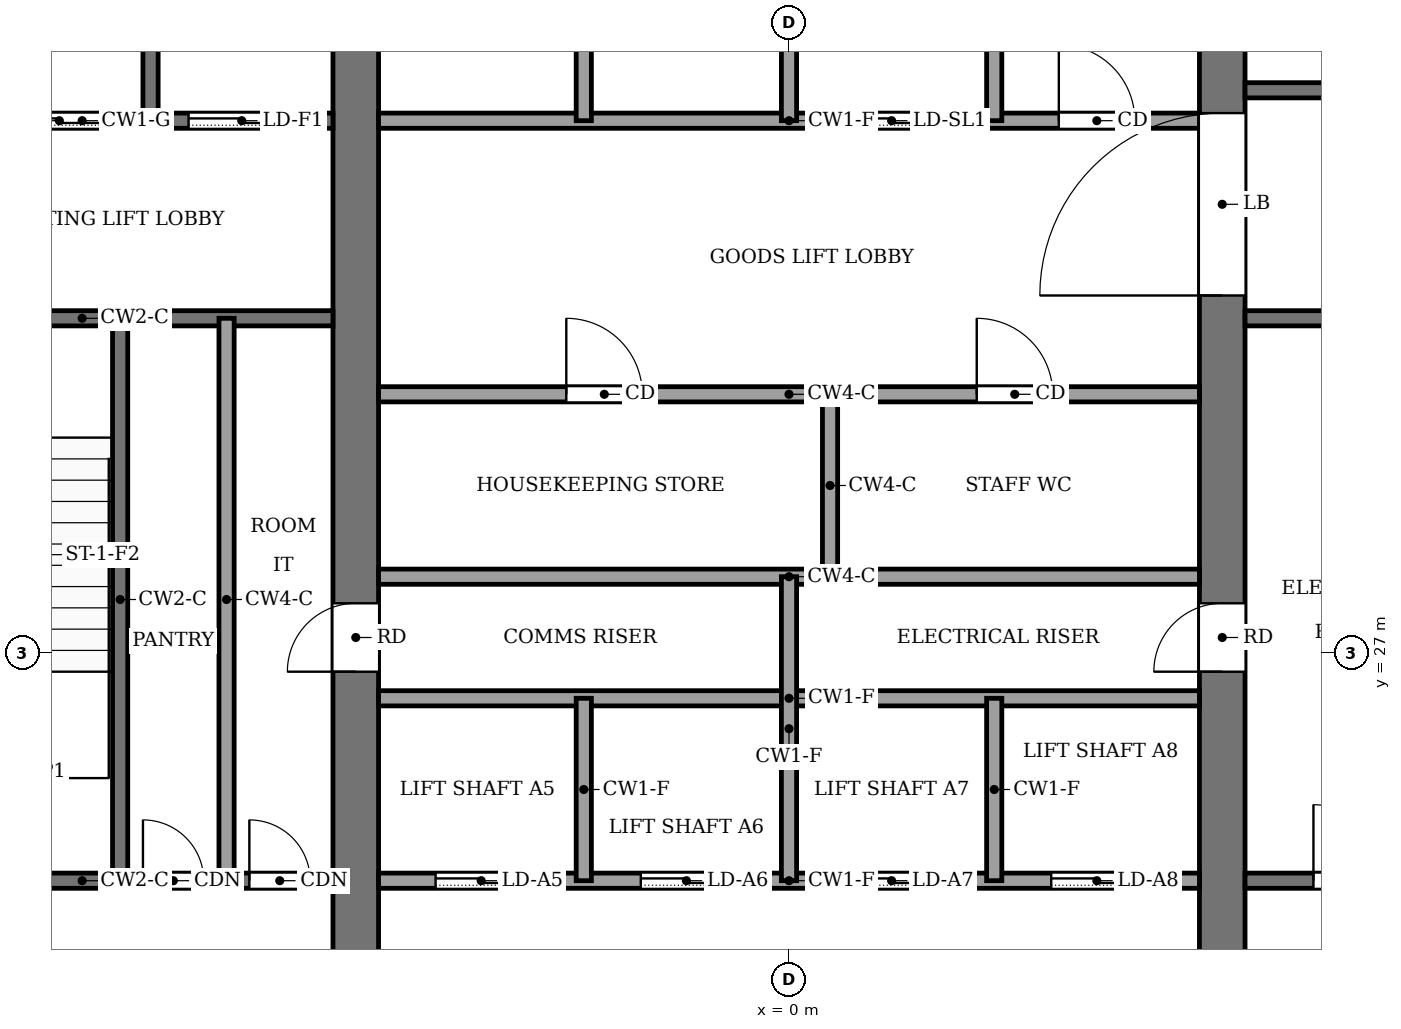
"""IFC4 building model, lengths in metres.
Left out: names, types, materials, properties, quantities, classifications, styles, units other than length and angle.
Written with IfcOpenShell. Run it as: python <this file> out.ifc"""

import sys

from ifc_helpers import new_model, si_unit, direction, frame, frame_2d, origin, place, context, subcontext, project, spatial, rectangle, extrude, element, fill, save


model = new_model("IFC4")
c1 = context("Model", 3, precision=1e-05, world=origin(), true_north=direction((0.0, 1.0)))
c2 = subcontext(c1, "Body", "Model", "MODEL_VIEW")
j1 = project(units=[si_unit("LENGTHUNIT", "METRE"), si_unit("PLANEANGLEUNIT", "RADIAN")], contexts=[c1])
p1 = place(None, origin())
s1 = spatial("IfcSite", under=j1, at=p1, CompositionType="ELEMENT")
p2 = place(p1, origin())
s2 = spatial("IfcBuilding", under=s1, at=p2, CompositionType="ELEMENT")
p3 = place(p2, frame((0.0, 0.0, 242.0)))
s3 = spatial("IfcBuildingStorey", under=s2, at=p3, CompositionType="ELEMENT", Elevation=242.0)
p4 = place(p3, frame((-5.7, 18.4, -0.13), z_axis=(0.0, 0.0, 1.0), x_axis=(0.0, 1.0, 0.0)))
e1 = element("IfcWall", 1, at=p4, inside=s3, PredefinedType="SHEAR", context=c2, shape_type="SweptSolid", body=[
    extrude(rectangle(XDim=19.2, YDim=0.6, at=frame_2d((9.6, 0.0))), origin(), (0.0, 0.0, 1.0), 4.0),
])
p5 = place(p4, frame((8.35, 0.0, 0.13)))
e2 = element("IfcOpeningElement", 2, at=p5, cuts=e1, PredefinedType="OPENING", context=c2, shape_type="SweptSolid", body=[
    extrude(rectangle(XDim=0.9, YDim=2.1, at=frame_2d((0.45, 1.05))), frame((0.0, 0.31, 0.0), z_axis=(0.0, -1.0, 0.0), x_axis=(1.0, 0.0, 0.0)), (0.0, 0.0, 1.0), 0.62),
])
p6 = place(p3, frame((5.7, 18.4, -0.13), z_axis=(0.0, 0.0, 1.0), x_axis=(0.0, 1.0, 0.0)))
e3 = element("IfcWall", 3, at=p6, inside=s3, PredefinedType="SHEAR", context=c2, shape_type="SweptSolid", body=[
    extrude(rectangle(XDim=19.2, YDim=0.6, at=frame_2d((9.6, 0.0))), origin(), (0.0, 0.0, 1.0), 4.0),
])
p7 = place(p6, frame((8.35, 0.0, 0.13)))
e4 = element("IfcOpeningElement", 4, at=p7, cuts=e3, PredefinedType="OPENING", context=c2, shape_type="SweptSolid", body=[
    extrude(rectangle(XDim=0.9, YDim=2.1, at=frame_2d((0.45, 1.05))), frame((0.0, 0.31, 0.0), z_axis=(0.0, -1.0, 0.0), x_axis=(1.0, 0.0, 0.0)), (0.0, 0.0, 1.0), 0.62),
])
p8 = place(p6, frame((13.3, 0.0, 0.13)))
e5 = element("IfcOpeningElement", 5, at=p8, cuts=e3, PredefinedType="OPENING", context=c2, shape_type="SweptSolid", body=[
    extrude(rectangle(XDim=2.4, YDim=2.4, at=frame_2d((1.2, 1.2))), frame((0.0, 0.31, 0.0), z_axis=(0.0, -1.0, 0.0), x_axis=(1.0, 0.0, 0.0)), (0.0, 0.0, 1.0), 0.62),
])
p9 = place(p3, frame((-12.6, 24.0, 0.0), z_axis=(0.0, 0.0, 1.0), x_axis=(1.0, 0.0, 0.0)))
e6 = element("IfcWall", 6, at=p9, inside=s3, PredefinedType="PARTITIONING", context=c2, shape_type="SweptSolid", body=[
    extrude(rectangle(XDim=6.6, YDim=0.2, at=frame_2d((3.3, 0.0))), origin(), (0.0, 0.0, 1.0), 3.87),
])
p10 = place(p9, frame((4.1, 0.0, 0.0)))
e7 = element("IfcOpeningElement", 7, at=p10, cuts=e6, PredefinedType="OPENING", context=c2, shape_type="SweptSolid", body=[
    extrude(rectangle(XDim=0.8, YDim=2.1, at=frame_2d((0.4, 1.05))), frame((0.0, 0.11, 0.0), z_axis=(0.0, -1.0, 0.0), x_axis=(1.0, 0.0, 0.0)), (0.0, 0.0, 1.0), 0.22),
])
p11 = place(p9, frame((5.5, 0.0, 0.0)))
e8 = element("IfcOpeningElement", 8, at=p11, cuts=e6, PredefinedType="OPENING", context=c2, shape_type="SweptSolid", body=[
    extrude(rectangle(XDim=0.8, YDim=2.1, at=frame_2d((0.4, 1.05))), frame((0.0, 0.11, 0.0), z_axis=(0.0, -1.0, 0.0), x_axis=(1.0, 0.0, 0.0)), (0.0, 0.0, 1.0), 0.22),
])
p12 = place(p3, frame((-5.4, 24.0, 0.0), z_axis=(0.0, 0.0, 1.0), x_axis=(1.0, 0.0, 0.0)))
e9 = element("IfcWall", 9, at=p12, inside=s3, PredefinedType="PARTITIONING", context=c2, shape_type="SweptSolid", body=[
    extrude(rectangle(XDim=10.8, YDim=0.2, at=frame_2d((5.4, 0.0))), origin(), (0.0, 0.0, 1.0), 3.87),
])
p13 = place(p12, frame((0.75, 0.0, 0.0)))
e10 = element("IfcOpeningElement", 10, at=p13, cuts=e9, PredefinedType="OPENING", context=c2, shape_type="SweptSolid", body=[
    extrude(rectangle(XDim=1.2, YDim=2.2, at=frame_2d((0.6, 1.1))), frame((0.0, 0.11, 0.0), z_axis=(0.0, -1.0, 0.0), x_axis=(1.0, 0.0, 0.0)), (0.0, 0.0, 1.0), 0.22),
])
p14 = place(p12, frame((3.45, 0.0, 0.0)))
e11 = element("IfcOpeningElement", 11, at=p14, cuts=e9, PredefinedType="OPENING", context=c2, shape_type="SweptSolid", body=[
    extrude(rectangle(XDim=1.2, YDim=2.2, at=frame_2d((0.6, 1.1))), frame((0.0, 0.11, 0.0), z_axis=(0.0, -1.0, 0.0), x_axis=(1.0, 0.0, 0.0)), (0.0, 0.0, 1.0), 0.22),
])
p15 = place(p12, frame((6.15, 0.0, 0.0)))
e12 = element("IfcOpeningElement", 12, at=p15, cuts=e9, PredefinedType="OPENING", context=c2, shape_type="SweptSolid", body=[
    extrude(rectangle(XDim=1.2, YDim=2.2, at=frame_2d((0.6, 1.1))), frame((0.0, 0.11, 0.0), z_axis=(0.0, -1.0, 0.0), x_axis=(1.0, 0.0, 0.0)), (0.0, 0.0, 1.0), 0.22),
])
p16 = place(p12, frame((8.85, 0.0, 0.0)))
e13 = element("IfcOpeningElement", 13, at=p16, cuts=e9, PredefinedType="OPENING", context=c2, shape_type="SweptSolid", body=[
    extrude(rectangle(XDim=1.2, YDim=2.2, at=frame_2d((0.6, 1.1))), frame((0.0, 0.11, 0.0), z_axis=(0.0, -1.0, 0.0), x_axis=(1.0, 0.0, 0.0)), (0.0, 0.0, 1.0), 0.22),
])
p17 = place(p3, frame((6.0, 24.0, 0.0), z_axis=(0.0, 0.0, 1.0), x_axis=(1.0, 0.0, 0.0)))
e14 = element("IfcWall", 14, at=p17, inside=s3, PredefinedType="PARTITIONING", context=c2, shape_type="SweptSolid", body=[
    extrude(rectangle(XDim=6.6, YDim=0.2, at=frame_2d((3.3, 0.0))), origin(), (0.0, 0.0, 1.0), 3.87),
])
p18 = place(p17, frame((0.9, 0.0, 0.0)))
e15 = element("IfcOpeningElement", 15, at=p18, cuts=e14, PredefinedType="OPENING", context=c2, shape_type="SweptSolid", body=[
    extrude(rectangle(XDim=1.0, YDim=2.1, at=frame_2d((0.5, 1.05))), frame((0.0, 0.11, 0.0), z_axis=(0.0, -1.0, 0.0), x_axis=(1.0, 0.0, 0.0)), (0.0, 0.0, 1.0), 0.22),
])
p19 = place(p17, frame((4.4, 0.0, 0.0)))
e16 = element("IfcOpeningElement", 16, at=p19, cuts=e14, PredefinedType="OPENING", context=c2, shape_type="SweptSolid", body=[
    extrude(rectangle(XDim=1.2, YDim=2.2, at=frame_2d((0.6, 1.1))), frame((0.0, 0.11, 0.0), z_axis=(0.0, -1.0, 0.0), x_axis=(1.0, 0.0, 0.0)), (0.0, 0.0, 1.0), 0.22),
])
for number, where, z_axis, x_axis in (
    (17, (-5.4, 26.4, 0.0), (0.0, 0.0, 1.0), (1.0, 0.0, 0.0)),
    (18, (-5.4, 28.0, 0.0), (0.0, 0.0, 1.0), (1.0, 0.0, 0.0)),
):
    element("IfcWall", number, at=place(p3, frame(where, z_axis=z_axis, x_axis=x_axis)), inside=s3, PredefinedType="PARTITIONING", context=c2, shape_type="SweptSolid", body=[
        extrude(rectangle(XDim=10.8, YDim=0.2, at=frame_2d((5.4, 0.0))), origin(), (0.0, 0.0, 1.0), 3.87),
    ])
p20 = place(p3, frame((-5.4, 30.4, 0.0), z_axis=(0.0, 0.0, 1.0), x_axis=(1.0, 0.0, 0.0)))
e19 = element("IfcWall", 19, at=p20, inside=s3, PredefinedType="PARTITIONING", context=c2, shape_type="SweptSolid", body=[
    extrude(rectangle(XDim=10.8, YDim=0.2, at=frame_2d((5.4, 0.0))), origin(), (0.0, 0.0, 1.0), 3.87),
])
p21 = place(p20, frame((2.47, 0.0, 0.0)))
e20 = element("IfcOpeningElement", 20, at=p21, cuts=e19, PredefinedType="OPENING", context=c2, shape_type="SweptSolid", body=[
    extrude(rectangle(XDim=1.0, YDim=2.1, at=frame_2d((0.5, 1.05))), frame((0.0, 0.11, 0.0), z_axis=(0.0, -1.0, 0.0), x_axis=(1.0, 0.0, 0.0)), (0.0, 0.0, 1.0), 0.22),
])
p22 = place(p20, frame((7.87, 0.0, 0.0)))
e21 = element("IfcOpeningElement", 21, at=p22, cuts=e19, PredefinedType="OPENING", context=c2, shape_type="SweptSolid", body=[
    extrude(rectangle(XDim=1.0, YDim=2.1, at=frame_2d((0.5, 1.05))), frame((0.0, 0.11, 0.0), z_axis=(0.0, -1.0, 0.0), x_axis=(1.0, 0.0, 0.0)), (0.0, 0.0, 1.0), 0.22),
])
p23 = place(p3, frame((-12.6, 31.4, 0.0), z_axis=(0.0, 0.0, 1.0), x_axis=(1.0, 0.0, 0.0)))
e22 = element("IfcWall", 22, at=p23, inside=s3, PredefinedType="PARTITIONING", context=c2, shape_type="SweptSolid", body=[
    extrude(rectangle(XDim=6.6, YDim=0.2, at=frame_2d((3.3, 0.0))), origin(), (0.0, 0.0, 1.0), 3.87),
])
p24 = place(p23, frame((1.0, 0.0, 0.0)))
e23 = element("IfcOpeningElement", 23, at=p24, cuts=e22, PredefinedType="OPENING", context=c2, shape_type="SweptSolid", body=[
    extrude(rectangle(XDim=1.2, YDim=2.2, at=frame_2d((0.6, 1.1))), frame((0.0, 0.11, 0.0), z_axis=(0.0, -1.0, 0.0), x_axis=(1.0, 0.0, 0.0)), (0.0, 0.0, 1.0), 0.22),
])
p25 = place(p3, frame((6.0, 31.4, 0.0), z_axis=(0.0, 0.0, 1.0), x_axis=(1.0, 0.0, 0.0)))
e24 = element("IfcWall", 24, at=p25, inside=s3, PredefinedType="PARTITIONING", context=c2, shape_type="SweptSolid", body=[
    extrude(rectangle(XDim=6.6, YDim=0.2, at=frame_2d((3.3, 0.0))), origin(), (0.0, 0.0, 1.0), 3.87),
])
p26 = place(p3, frame((-12.6, 34.0, 0.0), z_axis=(0.0, 0.0, 1.0), x_axis=(1.0, 0.0, 0.0)))
e25 = element("IfcWall", 25, at=p26, inside=s3, PredefinedType="PARTITIONING", context=c2, shape_type="SweptSolid", body=[
    extrude(rectangle(XDim=6.6, YDim=0.2, at=frame_2d((3.3, 0.0))), origin(), (0.0, 0.0, 1.0), 3.87),
])
p27 = place(p26, frame((4.7, 0.0, 0.0)))
e26 = element("IfcOpeningElement", 26, at=p27, cuts=e25, PredefinedType="OPENING", context=c2, shape_type="SweptSolid", body=[
    extrude(rectangle(XDim=1.4, YDim=2.2, at=frame_2d((0.7, 1.1))), frame((0.0, 0.11, 0.0), z_axis=(0.0, -1.0, 0.0), x_axis=(1.0, 0.0, 0.0)), (0.0, 0.0, 1.0), 0.22),
])
p28 = place(p26, frame((2.3, 0.0, 0.0)))
e27 = element("IfcOpeningElement", 27, at=p28, cuts=e25, PredefinedType="OPENING", context=c2, shape_type="SweptSolid", body=[
    extrude(rectangle(XDim=1.4, YDim=2.2, at=frame_2d((0.7, 1.1))), frame((0.0, 0.11, 0.0), z_axis=(0.0, -1.0, 0.0), x_axis=(1.0, 0.0, 0.0)), (0.0, 0.0, 1.0), 0.22),
])
p29 = place(p26, frame((0.45, 0.0, 0.0)))
e28 = element("IfcOpeningElement", 28, at=p29, cuts=e25, PredefinedType="OPENING", context=c2, shape_type="SweptSolid", body=[
    extrude(rectangle(XDim=0.9, YDim=2.1, at=frame_2d((0.45, 1.05))), frame((0.0, 0.11, 0.0), z_axis=(0.0, -1.0, 0.0), x_axis=(1.0, 0.0, 0.0)), (0.0, 0.0, 1.0), 0.22),
])
p30 = place(p3, frame((-5.4, 34.0, 0.0), z_axis=(0.0, 0.0, 1.0), x_axis=(1.0, 0.0, 0.0)))
e29 = element("IfcWall", 29, at=p30, inside=s3, PredefinedType="PARTITIONING", context=c2, shape_type="SweptSolid", body=[
    extrude(rectangle(XDim=10.8, YDim=0.2, at=frame_2d((5.4, 0.0))), origin(), (0.0, 0.0, 1.0), 3.87),
])
p31 = place(p30, frame((6.15, 0.0, 0.0)))
e30 = element("IfcOpeningElement", 30, at=p31, cuts=e29, PredefinedType="OPENING", context=c2, shape_type="SweptSolid", body=[
    extrude(rectangle(XDim=1.2, YDim=2.2, at=frame_2d((0.6, 1.1))), frame((0.0, 0.11, 0.0), z_axis=(0.0, -1.0, 0.0), x_axis=(1.0, 0.0, 0.0)), (0.0, 0.0, 1.0), 0.22),
])
p32 = place(p30, frame((8.95, 0.0, 0.0)))
e31 = element("IfcOpeningElement", 31, at=p32, cuts=e29, PredefinedType="OPENING", context=c2, shape_type="SweptSolid", body=[
    extrude(rectangle(XDim=1.0, YDim=2.1, at=frame_2d((0.5, 1.05))), frame((0.0, 0.11, 0.0), z_axis=(0.0, -1.0, 0.0), x_axis=(1.0, 0.0, 0.0)), (0.0, 0.0, 1.0), 0.22),
])
p33 = place(p3, frame((6.0, 34.4, 0.0), z_axis=(0.0, 0.0, 1.0), x_axis=(1.0, 0.0, 0.0)))
e32 = element("IfcWall", 32, at=p33, inside=s3, PredefinedType="PARTITIONING", context=c2, shape_type="SweptSolid", body=[
    extrude(rectangle(XDim=6.6, YDim=0.2, at=frame_2d((3.3, 0.0))), origin(), (0.0, 0.0, 1.0), 3.87),
])
p34 = place(p33, frame((4.8, 0.0, 0.0)))
e33 = element("IfcOpeningElement", 33, at=p34, cuts=e32, PredefinedType="OPENING", context=c2, shape_type="SweptSolid", body=[
    extrude(rectangle(XDim=1.2, YDim=2.2, at=frame_2d((0.6, 1.1))), frame((0.0, 0.11, 0.0), z_axis=(0.0, -1.0, 0.0), x_axis=(1.0, 0.0, 0.0)), (0.0, 0.0, 1.0), 0.22),
])
p35 = place(p3, frame((-8.8, 24.0, 0.0), z_axis=(0.0, 0.0, 1.0), x_axis=(0.0, 1.0, 0.0)))
e34 = element("IfcWall", 34, at=p35, inside=s3, PredefinedType="PARTITIONING", context=c2, shape_type="SweptSolid", body=[
    extrude(rectangle(XDim=7.4, YDim=0.2, at=frame_2d((3.7, 0.0))), origin(), (0.0, 0.0, 1.0), 3.87),
])
p36 = place(p3, frame((-8.4, 34.0, 0.0), z_axis=(0.0, 0.0, 1.0), x_axis=(0.0, 1.0, 0.0)))
e35 = element("IfcWall", 35, at=p36, inside=s3, PredefinedType="PARTITIONING", context=c2, shape_type="SweptSolid", body=[
    extrude(rectangle(XDim=3.6, YDim=0.2, at=frame_2d((1.8, 0.0))), origin(), (0.0, 0.0, 1.0), 3.87),
])
p37 = place(p3, frame((-7.4, 24.0, 0.0), z_axis=(0.0, 0.0, 1.0), x_axis=(0.0, 1.0, 0.0)))
e36 = element("IfcWall", 36, at=p37, inside=s3, PredefinedType="PARTITIONING", context=c2, shape_type="SweptSolid", body=[
    extrude(rectangle(XDim=7.4, YDim=0.2, at=frame_2d((3.7, 0.0))), origin(), (0.0, 0.0, 1.0), 3.87),
])
p38 = place(p3, frame((-2.7, 24.0, 0.0), z_axis=(0.0, 0.0, 1.0), x_axis=(0.0, 1.0, 0.0)))
e37 = element("IfcWall", 37, at=p38, inside=s3, PredefinedType="PARTITIONING", context=c2, shape_type="SweptSolid", body=[
    extrude(rectangle(XDim=2.4, YDim=0.2, at=frame_2d((1.2, 0.0))), origin(), (0.0, 0.0, 1.0), 3.87),
])
p39 = place(p3, frame((-2.7, 34.0, 0.0), z_axis=(0.0, 0.0, 1.0), x_axis=(0.0, 1.0, 0.0)))
e38 = element("IfcWall", 38, at=p39, inside=s3, PredefinedType="PARTITIONING", context=c2, shape_type="SweptSolid", body=[
    extrude(rectangle(XDim=3.6, YDim=0.2, at=frame_2d((1.8, 0.0))), origin(), (0.0, 0.0, 1.0), 3.87),
])
p40 = place(p3, frame((0.0, 24.0, 0.0), z_axis=(0.0, 0.0, 1.0), x_axis=(0.0, 1.0, 0.0)))
e39 = element("IfcWall", 39, at=p40, inside=s3, PredefinedType="PARTITIONING", context=c2, shape_type="SweptSolid", body=[
    extrude(rectangle(XDim=4.0, YDim=0.2, at=frame_2d((2.0, 0.0))), origin(), (0.0, 0.0, 1.0), 3.87),
])
p41 = place(p3, frame((0.0, 34.0, 0.0), z_axis=(0.0, 0.0, 1.0), x_axis=(0.0, 1.0, 0.0)))
e40 = element("IfcWall", 40, at=p41, inside=s3, PredefinedType="PARTITIONING", context=c2, shape_type="SweptSolid", body=[
    extrude(rectangle(XDim=3.6, YDim=0.2, at=frame_2d((1.8, 0.0))), origin(), (0.0, 0.0, 1.0), 3.87),
])
for number, where, z_axis, x_axis in (
    (41, (0.54, 28.0, 0.0), (0.0, 0.0, 1.0), (0.0, 1.0, 0.0)),
    (42, (2.7, 24.0, 0.0), (0.0, 0.0, 1.0), (0.0, 1.0, 0.0)),
):
    element("IfcWall", number, at=place(p3, frame(where, z_axis=z_axis, x_axis=x_axis)), inside=s3, PredefinedType="PARTITIONING", context=c2, shape_type="SweptSolid", body=[
        extrude(rectangle(XDim=2.4, YDim=0.2, at=frame_2d((1.2, 0.0))), origin(), (0.0, 0.0, 1.0), 3.87),
    ])
p42 = place(p3, frame((2.7, 34.0, 0.0), z_axis=(0.0, 0.0, 1.0), x_axis=(0.0, 1.0, 0.0)))
e43 = element("IfcWall", 43, at=p42, inside=s3, PredefinedType="PARTITIONING", context=c2, shape_type="SweptSolid", body=[
    extrude(rectangle(XDim=3.6, YDim=0.2, at=frame_2d((1.8, 0.0))), origin(), (0.0, 0.0, 1.0), 3.87),
])
p43 = place(p13, origin())
e44 = element("IfcDoor", 44, at=p43, inside=s3, OperationType="SLIDING_TO_LEFT", PredefinedType="DOOR", context=c2, shape_type="SweptSolid", body=[
    extrude(rectangle(XDim=1.2, YDim=2.2, at=frame_2d((0.6, 1.1))), frame((0.0, 0.025, 0.0), z_axis=(0.0, -1.0, 0.0), x_axis=(1.0, 0.0, 0.0)), (0.0, 0.0, 1.0), 0.05),
])
fill(e10, e44)
p44 = place(p14, origin())
e45 = element("IfcDoor", 45, at=p44, inside=s3, OperationType="SLIDING_TO_LEFT", PredefinedType="DOOR", context=c2, shape_type="SweptSolid", body=[
    extrude(rectangle(XDim=1.2, YDim=2.2, at=frame_2d((0.6, 1.1))), frame((0.0, 0.025, 0.0), z_axis=(0.0, -1.0, 0.0), x_axis=(1.0, 0.0, 0.0)), (0.0, 0.0, 1.0), 0.05),
])
fill(e11, e45)
p45 = place(p15, origin())
e46 = element("IfcDoor", 46, at=p45, inside=s3, OperationType="SLIDING_TO_LEFT", PredefinedType="DOOR", context=c2, shape_type="SweptSolid", body=[
    extrude(rectangle(XDim=1.2, YDim=2.2, at=frame_2d((0.6, 1.1))), frame((0.0, 0.025, 0.0), z_axis=(0.0, -1.0, 0.0), x_axis=(1.0, 0.0, 0.0)), (0.0, 0.0, 1.0), 0.05),
])
fill(e12, e46)
p46 = place(p16, origin())
e47 = element("IfcDoor", 47, at=p46, inside=s3, OperationType="SLIDING_TO_LEFT", PredefinedType="DOOR", context=c2, shape_type="SweptSolid", body=[
    extrude(rectangle(XDim=1.2, YDim=2.2, at=frame_2d((0.6, 1.1))), frame((0.0, 0.025, 0.0), z_axis=(0.0, -1.0, 0.0), x_axis=(1.0, 0.0, 0.0)), (0.0, 0.0, 1.0), 0.05),
])
fill(e13, e47)
p47 = place(p31, origin())
e48 = element("IfcDoor", 48, at=p47, inside=s3, OperationType="SLIDING_TO_LEFT", PredefinedType="DOOR", context=c2, shape_type="SweptSolid", body=[
    extrude(rectangle(XDim=1.2, YDim=2.2, at=frame_2d((0.6, 1.1))), frame((0.0, 0.025, 0.0), z_axis=(0.0, -1.0, 0.0), x_axis=(1.0, 0.0, 0.0)), (0.0, 0.0, 1.0), 0.05),
])
fill(e30, e48)
p48 = place(p27, origin())
e49 = element("IfcDoor", 49, at=p48, inside=s3, OperationType="SLIDING_TO_LEFT", PredefinedType="DOOR", context=c2, shape_type="SweptSolid", body=[
    extrude(rectangle(XDim=1.4, YDim=2.2, at=frame_2d((0.7, 1.1))), frame((0.0, 0.025, 0.0), z_axis=(0.0, -1.0, 0.0), x_axis=(1.0, 0.0, 0.0)), (0.0, 0.0, 1.0), 0.05),
])
fill(e26, e49)
p49 = place(p28, origin())
e50 = element("IfcDoor", 50, at=p49, inside=s3, OperationType="SLIDING_TO_LEFT", PredefinedType="DOOR", context=c2, shape_type="SweptSolid", body=[
    extrude(rectangle(XDim=1.4, YDim=2.2, at=frame_2d((0.7, 1.1))), frame((0.0, 0.025, 0.0), z_axis=(0.0, -1.0, 0.0), x_axis=(1.0, 0.0, 0.0)), (0.0, 0.0, 1.0), 0.05),
])
fill(e27, e50)
p50 = place(p21, origin())
e51 = element("IfcDoor", 51, at=p50, inside=s3, OperationType="SINGLE_SWING_RIGHT", PredefinedType="DOOR", context=c2, shape_type="SweptSolid", body=[
    extrude(rectangle(XDim=1.0, YDim=2.1, at=frame_2d((0.5, 1.05))), frame((0.0, 0.025, 0.0), z_axis=(0.0, -1.0, 0.0), x_axis=(1.0, 0.0, 0.0)), (0.0, 0.0, 1.0), 0.05),
])
fill(e20, e51)
p51 = place(p22, origin())
e52 = element("IfcDoor", 52, at=p51, inside=s3, OperationType="SINGLE_SWING_LEFT", PredefinedType="DOOR", context=c2, shape_type="SweptSolid", body=[
    extrude(rectangle(XDim=1.0, YDim=2.1, at=frame_2d((0.5, 1.05))), frame((0.0, 0.025, 0.0), z_axis=(0.0, -1.0, 0.0), x_axis=(1.0, 0.0, 0.0)), (0.0, 0.0, 1.0), 0.05),
])
fill(e21, e52)
p52 = place(p10, origin())
e53 = element("IfcDoor", 53, at=p52, inside=s3, OperationType="SINGLE_SWING_LEFT", PredefinedType="DOOR", context=c2, shape_type="SweptSolid", body=[
    extrude(rectangle(XDim=0.8, YDim=2.1, at=frame_2d((0.4, 1.05))), frame((0.0, 0.025, 0.0), z_axis=(0.0, -1.0, 0.0), x_axis=(1.0, 0.0, 0.0)), (0.0, 0.0, 1.0), 0.05),
])
fill(e7, e53)
p53 = place(p11, origin())
e54 = element("IfcDoor", 54, at=p53, inside=s3, OperationType="SINGLE_SWING_RIGHT", PredefinedType="DOOR", context=c2, shape_type="SweptSolid", body=[
    extrude(rectangle(XDim=0.8, YDim=2.1, at=frame_2d((0.4, 1.05))), frame((0.0, 0.025, 0.0), z_axis=(0.0, -1.0, 0.0), x_axis=(1.0, 0.0, 0.0)), (0.0, 0.0, 1.0), 0.05),
])
fill(e8, e54)
p54 = place(p18, origin())
e55 = element("IfcDoor", 55, at=p54, inside=s3, OperationType="SINGLE_SWING_RIGHT", PredefinedType="DOOR", context=c2, shape_type="SweptSolid", body=[
    extrude(rectangle(XDim=1.0, YDim=2.1, at=frame_2d((0.5, 1.05))), frame((0.0, 0.025, 0.0), z_axis=(0.0, -1.0, 0.0), x_axis=(1.0, 0.0, 0.0)), (0.0, 0.0, 1.0), 0.05),
])
fill(e15, e55)
p55 = place(p32, origin())
e56 = element("IfcDoor", 56, at=p55, inside=s3, OperationType="SINGLE_SWING_LEFT", PredefinedType="DOOR", context=c2, shape_type="SweptSolid", body=[
    extrude(rectangle(XDim=1.0, YDim=2.1, at=frame_2d((0.5, 1.05))), frame((0.0, 0.025, 0.0), z_axis=(0.0, -1.0, 0.0), x_axis=(1.0, 0.0, 0.0)), (0.0, 0.0, 1.0), 0.05),
])
fill(e31, e56)
p56 = place(p5, origin())
e57 = element("IfcDoor", 57, at=p56, inside=s3, OperationType="SINGLE_SWING_LEFT", PredefinedType="DOOR", context=c2, shape_type="SweptSolid", body=[
    extrude(rectangle(XDim=0.9, YDim=2.1, at=frame_2d((0.45, 1.05))), frame((0.0, 0.025, 0.0), z_axis=(0.0, -1.0, 0.0), x_axis=(1.0, 0.0, 0.0)), (0.0, 0.0, 1.0), 0.05),
])
fill(e2, e57)
p57 = place(p7, origin())
e58 = element("IfcDoor", 58, at=p57, inside=s3, OperationType="SINGLE_SWING_RIGHT", PredefinedType="DOOR", context=c2, shape_type="SweptSolid", body=[
    extrude(rectangle(XDim=0.9, YDim=2.1, at=frame_2d((0.45, 1.05))), frame((0.0, 0.025, 0.0), z_axis=(0.0, -1.0, 0.0), x_axis=(1.0, 0.0, 0.0)), (0.0, 0.0, 1.0), 0.05),
])
fill(e4, e58)
p58 = place(p8, origin())
e59 = element("IfcDoor", 59, at=p58, inside=s3, OperationType="DOUBLE_DOOR_SINGLE_SWING", PredefinedType="DOOR", context=c2, shape_type="SweptSolid", body=[
    extrude(rectangle(XDim=2.4, YDim=2.4, at=frame_2d((1.2, 1.2))), frame((0.0, 0.025, 0.0), z_axis=(0.0, -1.0, 0.0), x_axis=(1.0, 0.0, 0.0)), (0.0, 0.0, 1.0), 0.05),
])
fill(e5, e59)
save(model, sys.argv[1])
